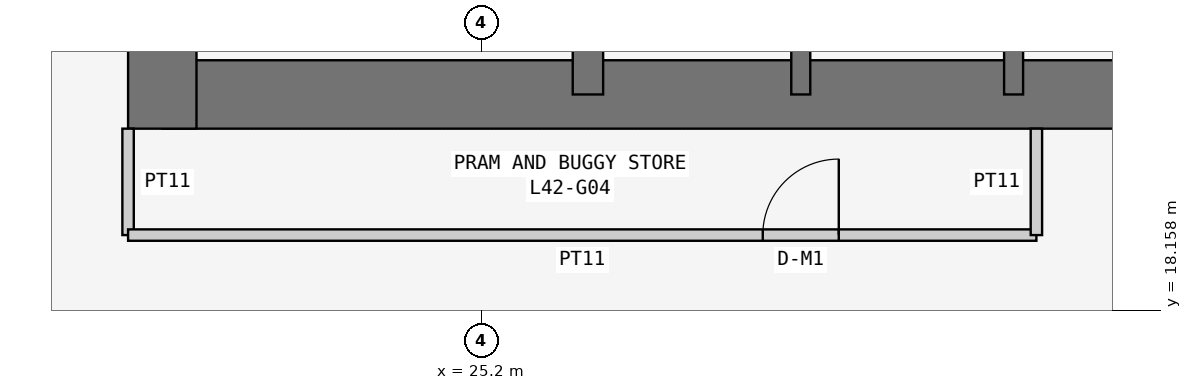
"""IFC4 building model, lengths in metres.
Left out: names, types, materials, properties, quantities, classifications, styles, units other than length and angle.
Written with IfcOpenShell. Run it as: python <this file> out.ifc"""

import sys

from ifc_helpers import new_model, si_unit, direction, frame, frame_2d, origin, place, context, subcontext, project, spatial, rectangle, extrude, element, fill, save


model = new_model("IFC4")
c1 = context("Model", 3, precision=1e-05, world=origin(), true_north=direction((0.0, 1.0)))
c2 = subcontext(c1, "Body", "Model", "MODEL_VIEW")
j1 = project(units=[si_unit("LENGTHUNIT", "METRE"), si_unit("PLANEANGLEUNIT", "RADIAN")], contexts=[c1])
p1 = place(None, origin())
s1 = spatial("IfcSite", under=j1, at=p1, CompositionType="ELEMENT")
p2 = place(p1, origin())
s2 = spatial("IfcBuilding", under=s1, at=p2, CompositionType="ELEMENT")
p3 = place(p2, frame((0.0, 0.0, 162.9)))
s3 = spatial("IfcBuildingStorey", under=s2, at=p3, CompositionType="ELEMENT", Elevation=162.9)
p4 = place(p3, frame((21.0, 21.0, 0.0), z_axis=(0.0, 0.0, 1.0), x_axis=(1.0, 0.0, 0.0)))
e1 = element("IfcWall", 1, at=p4, inside=s3, PredefinedType="SHEAR", context=c2, shape_type="SweptSolid", body=[
    extrude(rectangle(XDim=17.25, YDim=0.9, at=frame_2d((8.625, 0.0))), origin(), (0.0, 0.0, 1.0), 3.6),
])
p5 = place(p3, frame((21.0, 37.8, 0.0), z_axis=(0.0, 0.0, 1.0), x_axis=(0.0, -1.0, 0.0)))
e2 = element("IfcWall", 2, at=p5, inside=s3, PredefinedType="SHEAR", context=c2, shape_type="SweptSolid", body=[
    extrude(rectangle(XDim=17.25, YDim=0.9, at=frame_2d((8.625, 0.0))), origin(), (0.0, 0.0, 1.0), 3.6),
])
p6 = place(p5, frame((5.4, 0.0, 0.0)))
e3 = element("IfcOpeningElement", 3, at=p6, cuts=e2, PredefinedType="OPENING", context=c2, shape_type="SweptSolid", body=[
    extrude(rectangle(XDim=1.2, YDim=2.1, at=frame_2d((0.6, 1.05))), frame((0.0, 0.46, 0.0), z_axis=(0.0, -1.0, 0.0), x_axis=(1.0, 0.0, 0.0)), (0.0, 0.0, 1.0), 0.92),
])
p7 = place(p3, frame((26.6, 21.0, 0.0), z_axis=(0.0, 0.0, 1.0), x_axis=(0.0, 1.0, 0.0)))
e4 = element("IfcWall", 4, at=p7, inside=s3, PredefinedType="SHEAR", context=c2, shape_type="SweptSolid", body=[
    extrude(rectangle(XDim=16.8, YDim=0.4, at=frame_2d((8.4, 0.0))), origin(), (0.0, 0.0, 1.0), 3.6),
])
p8 = place(p7, frame((10.4, 0.0, 0.0)))
e5 = element("IfcOpeningElement", 5, at=p8, cuts=e4, PredefinedType="OPENING", context=c2, shape_type="SweptSolid", body=[
    extrude(rectangle(XDim=1.2, YDim=2.1, at=frame_2d((0.6, 1.05))), frame((0.0, 0.21, 0.0), z_axis=(0.0, -1.0, 0.0), x_axis=(1.0, 0.0, 0.0)), (0.0, 0.0, 1.0), 0.42),
])
for number, where, z_axis, x_axis in (
    (6, (29.4, 21.0, 0.0), (0.0, 0.0, 1.0), (0.0, 1.0, 0.0)),
    (7, (32.2, 21.0, 0.0), (0.0, 0.0, 1.0), (0.0, 1.0, 0.0)),
):
    element("IfcWall", number, at=place(p3, frame(where, z_axis=z_axis, x_axis=x_axis)), inside=s3, PredefinedType="SHEAR", context=c2, shape_type="SweptSolid", body=[
        extrude(rectangle(XDim=3.2, YDim=0.25, at=frame_2d((1.6, 0.0))), origin(), (0.0, 0.0, 1.0), 3.6),
    ])
p9 = place(p3, frame((20.55, 20.55, 0.0), z_axis=(0.0, 0.0, 1.0), x_axis=(0.0, -1.0, 0.0)))
e8 = element("IfcWall", 8, at=p9, inside=s3, PredefinedType="PARTITIONING", context=c2, shape_type="SweptSolid", body=[
    extrude(rectangle(XDim=1.4, YDim=0.15, at=frame_2d((0.7, 0.0))), origin(), (0.0, 0.0, 1.0), 3.45),
])
p10 = place(p3, frame((20.55, 19.15, 0.0), z_axis=(0.0, 0.0, 1.0), x_axis=(1.0, 0.0, 0.0)))
e9 = element("IfcWall", 9, at=p10, inside=s3, PredefinedType="PARTITIONING", context=c2, shape_type="SweptSolid", body=[
    extrude(rectangle(XDim=11.95, YDim=0.15, at=frame_2d((5.975, 0.0))), origin(), (0.0, 0.0, 1.0), 3.45),
])
p11 = place(p10, frame((8.35, 0.0, 0.0)))
e10 = element("IfcOpeningElement", 10, at=p11, cuts=e9, PredefinedType="OPENING", context=c2, shape_type="SweptSolid", body=[
    extrude(rectangle(XDim=1.0, YDim=2.1, at=frame_2d((0.5, 1.05))), frame((0.0, 0.085, 0.0), z_axis=(0.0, -1.0, 0.0), x_axis=(1.0, 0.0, 0.0)), (0.0, 0.0, 1.0), 0.17),
])
p12 = place(p3, frame((32.5, 19.15, 0.0), z_axis=(0.0, 0.0, 1.0), x_axis=(0.0, 1.0, 0.0)))
e11 = element("IfcWall", 11, at=p12, inside=s3, PredefinedType="PARTITIONING", context=c2, shape_type="SweptSolid", body=[
    extrude(rectangle(XDim=1.4, YDim=0.15, at=frame_2d((0.7, 0.0))), origin(), (0.0, 0.0, 1.0), 3.45),
])
p13 = place(p11, origin())
e12 = element("IfcDoor", 12, at=p13, inside=s3, OperationType="SINGLE_SWING_RIGHT", PredefinedType="DOOR", context=c2, shape_type="SweptSolid", body=[
    extrude(rectangle(XDim=1.0, YDim=2.1, at=frame_2d((0.5, 1.05))), frame((0.0, 0.025, 0.0), z_axis=(0.0, -1.0, 0.0), x_axis=(1.0, 0.0, 0.0)), (0.0, 0.0, 1.0), 0.05),
])
fill(e10, e12)
save(model, sys.argv[1])
